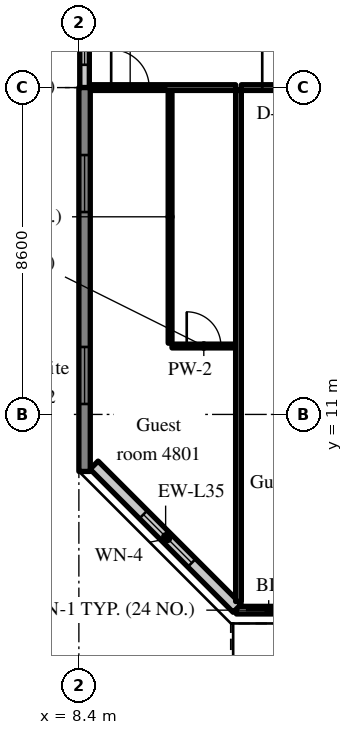
"""IFC4 building model, lengths in metres.
Left out: names, types, materials, properties, quantities, classifications, styles, units other than length and angle.
Written with IfcOpenShell. Run it as: python <this file> out.ifc"""

import sys

from ifc_helpers import new_model, si_unit, direction, frame, frame_2d, origin, place, context, subcontext, project, spatial, rectangle, extrude, source, transform, mapped, element, fill, save


model = new_model("IFC4")
c1 = context("Model", 3, precision=1e-05, world=origin(), true_north=direction((0.0, 1.0)))
c2 = subcontext(c1, "Body", "Model", "MODEL_VIEW")
j1 = project(units=[si_unit("LENGTHUNIT", "METRE"), si_unit("PLANEANGLEUNIT", "RADIAN")], contexts=[c1])
p1 = place(None, origin())
s1 = spatial("IfcSite", under=j1, at=p1, CompositionType="ELEMENT")
p2 = place(p1, origin())
s2 = spatial("IfcBuilding", under=s1, at=p2, CompositionType="ELEMENT")
p3 = place(p2, frame((0.0, 0.0, 197.2)))
s3 = spatial("IfcBuildingStorey", under=s2, at=p3, CompositionType="ELEMENT", Elevation=197.2)
m1 = source(origin(), c2, "Body", "SweptSolid", [
    extrude(rectangle(XDim=10.1, YDim=0.3, at=frame_2d((5.05, 0.0))), origin(), (0.0, 0.0, 1.0), 3.52),
])
p4 = place(p3, frame((8.55, 9.5, 0.0), z_axis=(0.0, 0.0, 1.0), x_axis=(0.0, 1.0, 0.0)))
e1 = element("IfcWall", 1, at=p4, inside=s3, PredefinedType="SHEAR", context=c2, shape_type="MappedRepresentation", body=[
    mapped(m1, transform((0.0, 0.0, 0.0), scale=1.0)),
])
m2 = source(origin(), c2, "Body", "SweptSolid", [
    extrude(rectangle(XDim=1.5, YDim=1.5, at=frame_2d((0.75, 0.75))), frame((0.0, 0.16, 0.0), z_axis=(0.0, -1.0, 0.0), x_axis=(1.0, 0.0, 0.0)), (0.0, 0.0, 1.0), 0.32),
])
p5 = place(p4, frame((1.775, 0.0, 0.9)))
e2 = element("IfcOpeningElement", 2, at=p5, cuts=e1, PredefinedType="OPENING", context=c2, shape_type="MappedRepresentation", body=[
    mapped(m2, transform((0.0, 0.0, 0.0), scale=1.0)),
])
p6 = place(p4, frame((6.825, 0.0, 0.9)))
e3 = element("IfcOpeningElement", 3, at=p6, cuts=e1, PredefinedType="OPENING", context=c2, shape_type="MappedRepresentation", body=[
    mapped(m2, transform((0.0, 0.0, 0.0), scale=1.0)),
])
m3 = source(origin(), c2, "Body", "SweptSolid", [
    extrude(rectangle(XDim=4.105, YDim=0.2, at=frame_2d((2.052, 0.0))), origin(), (0.0, 0.0, 1.0), 2.87),
])
p7 = place(p3, frame((12.545, 5.85, 0.0), z_axis=(0.0, 0.0, 1.0), x_axis=(1.0, 0.0, 0.0)))
e4 = element("IfcWall", 4, at=p7, inside=s3, PredefinedType="SOLIDWALL", context=c2, shape_type="MappedRepresentation", body=[
    mapped(m3, transform((0.0, 0.0, 0.0), scale=1.0)),
])
m4 = source(origin(), c2, "Body", "SweptSolid", [
    extrude(rectangle(XDim=1.2, YDim=2.4, at=frame_2d((0.6, 1.2))), frame((0.0, 0.11, 0.0), z_axis=(0.0, -1.0, 0.0), x_axis=(1.0, 0.0, 0.0)), (0.0, 0.0, 1.0), 0.22),
])
p8 = place(p7, frame((0.25, 0.0, 0.0)))
e5 = element("IfcOpeningElement", 5, at=p8, cuts=e4, PredefinedType="OPENING", context=c2, shape_type="MappedRepresentation", body=[
    mapped(m4, transform((0.0, 0.0, 0.0), scale=1.0)),
])
m5 = source(origin(), c2, "Body", "SweptSolid", [
    extrude(rectangle(XDim=1.5, YDim=1.5, at=frame_2d((0.75, 0.75))), frame((0.0, 0.11, 0.0), z_axis=(0.0, -1.0, 0.0), x_axis=(1.0, 0.0, 0.0)), (0.0, 0.0, 1.0), 0.22),
])
p9 = place(p7, frame((2.355, 0.0, 0.9)))
e6 = element("IfcOpeningElement", 6, at=p9, cuts=e4, PredefinedType="OPENING", context=c2, shape_type="MappedRepresentation", body=[
    mapped(m5, transform((0.0, 0.0, 0.0), scale=1.0)),
])
m6 = source(origin(), c2, "Body", "SweptSolid", [
    extrude(rectangle(XDim=5.326, YDim=0.3, at=frame_2d((2.663, 0.0))), origin(), (0.0, 0.0, 1.0), 3.52),
])
p10 = place(p3, frame((8.8, 9.666, 0.0), z_axis=(0.0, 0.0, 1.0), x_axis=(0.707083859269, -0.707129702361, 0.0)))
e7 = element("IfcWall", 7, at=p10, inside=s3, PredefinedType="SOLIDWALL", context=c2, shape_type="MappedRepresentation", body=[
    mapped(m6, transform((0.0, 0.0, 0.0), scale=1.0)),
])
m7 = source(origin(), c2, "Body", "SweptSolid", [
    extrude(rectangle(XDim=1.8, YDim=1.5, at=frame_2d((0.9, 0.75))), frame((0.0, 0.16, 0.0), z_axis=(0.0, -1.0, 0.0), x_axis=(1.0, 0.0, 0.0)), (0.0, 0.0, 1.0), 0.32),
])
p11 = place(p10, frame((1.836, 0.0, 0.9)))
e8 = element("IfcOpeningElement", 8, at=p11, cuts=e7, PredefinedType="OPENING", context=c2, shape_type="MappedRepresentation", body=[
    mapped(m7, transform((0.0, 0.0, 0.0), scale=1.0)),
])
m8 = source(origin(), c2, "Body", "SweptSolid", [
    extrude(rectangle(XDim=2.4, YDim=0.25, at=frame_2d((1.2, 0.0))), origin(), (0.0, 0.0, 1.0), 2.62),
])
p12 = place(p3, frame((8.55, 19.6, 0.0), z_axis=(0.0, 0.0, 1.0), x_axis=(0.0, 1.0, 0.0)))
e9 = element("IfcWall", 9, at=p12, inside=s3, PredefinedType="SOLIDWALL", context=c2, shape_type="MappedRepresentation", body=[
    mapped(m8, transform((0.0, 0.0, 0.0), scale=1.0)),
])
m9 = source(origin(), c2, "Body", "SweptSolid", [
    extrude(rectangle(XDim=1.2, YDim=1.5, at=frame_2d((0.6, 0.75))), frame((0.0, 0.135, 0.0), z_axis=(0.0, -1.0, 0.0), x_axis=(1.0, 0.0, 0.0)), (0.0, 0.0, 1.0), 0.27),
])
p13 = place(p12, frame((0.6, 0.0, 0.9)))
e10 = element("IfcOpeningElement", 10, at=p13, cuts=e9, PredefinedType="OPENING", context=c2, shape_type="MappedRepresentation", body=[
    mapped(m9, transform((0.0, 0.0, 0.0), scale=1.0)),
])
m10 = source(origin(), c2, "Body", "SweptSolid", [
    extrude(rectangle(XDim=6.65, YDim=0.1, at=frame_2d((3.325, 0.0))), origin(), (0.0, 0.0, 1.0), 3.52),
])
p14 = place(p3, frame((10.8, 12.875, 0.0), z_axis=(0.0, 0.0, 1.0), x_axis=(0.0, 1.0, 0.0)))
e11 = element("IfcWall", 11, at=p14, inside=s3, PredefinedType="PARTITIONING", context=c2, shape_type="MappedRepresentation", body=[
    mapped(m10, transform((0.0, 0.0, 0.0), scale=1.0)),
])
m11 = source(origin(), c2, "Body", "SweptSolid", [
    extrude(rectangle(XDim=1.675, YDim=0.1, at=frame_2d((0.837, 0.0))), origin(), (0.0, 0.0, 1.0), 3.52),
])
p15 = place(p3, frame((10.85, 12.8, 0.0), z_axis=(0.0, 0.0, 1.0), x_axis=(1.0, 0.0, 0.0)))
e12 = element("IfcWall", 12, at=p15, inside=s3, PredefinedType="PARTITIONING", context=c2, shape_type="MappedRepresentation", body=[
    mapped(m11, transform((0.0, 0.0, 0.0), scale=1.0)),
])
m12 = source(origin(), c2, "Body", "SweptSolid", [
    extrude(rectangle(XDim=0.9, YDim=2.1, at=frame_2d((0.45, 1.05))), frame((0.0, 0.06, 0.0), z_axis=(0.0, -1.0, 0.0), x_axis=(1.0, 0.0, 0.0)), (0.0, 0.0, 1.0), 0.12),
])
p16 = place(p15, frame((0.388, 0.0, 0.0)))
e13 = element("IfcOpeningElement", 13, at=p16, cuts=e12, PredefinedType="OPENING", context=c2, shape_type="MappedRepresentation", body=[
    mapped(m12, transform((0.0, 0.0, 0.0), scale=1.0)),
])
m13 = source(origin(), c2, "Body", "SweptSolid", [
    extrude(rectangle(XDim=3.825, YDim=0.15, at=frame_2d((1.913, 0.0))), origin(), (0.0, 0.0, 1.0), 2.82),
])
p17 = place(p3, frame((8.7, 19.6, 0.0), z_axis=(0.0, 0.0, 1.0), x_axis=(1.0, 0.0, 0.0)))
e14 = element("IfcWall", 14, at=p17, inside=s3, PredefinedType="PARTITIONING", context=c2, shape_type="MappedRepresentation", body=[
    mapped(m13, transform((0.0, 0.0, 0.0), scale=1.0)),
])
m14 = source(origin(), c2, "Body", "SweptSolid", [
    extrude(rectangle(XDim=1.0, YDim=2.1, at=frame_2d((0.5, 1.05))), frame((0.0, 0.085, 0.0), z_axis=(0.0, -1.0, 0.0), x_axis=(1.0, 0.0, 0.0)), (0.0, 0.0, 1.0), 0.17),
])
p18 = place(p17, frame((0.55, 0.0, 0.0)))
e15 = element("IfcOpeningElement", 15, at=p18, cuts=e14, PredefinedType="OPENING", context=c2, shape_type="MappedRepresentation", body=[
    mapped(m14, transform((0.0, 0.0, 0.0), scale=1.0)),
])
m15 = source(origin(), c2, "Body", "SweptSolid", [
    extrude(rectangle(XDim=3.975, YDim=0.15, at=frame_2d((1.987, 0.0))), origin(), (0.0, 0.0, 1.0), 2.82),
])
p19 = place(p3, frame((12.675, 19.6, 0.0), z_axis=(0.0, 0.0, 1.0), x_axis=(1.0, 0.0, 0.0)))
e16 = element("IfcWall", 16, at=p19, inside=s3, PredefinedType="PARTITIONING", context=c2, shape_type="MappedRepresentation", body=[
    mapped(m15, transform((0.0, 0.0, 0.0), scale=1.0)),
])
p20 = place(p19, frame((0.55, 0.0, 0.0)))
e17 = element("IfcOpeningElement", 17, at=p20, cuts=e16, PredefinedType="OPENING", context=c2, shape_type="MappedRepresentation", body=[
    mapped(m14, transform((0.0, 0.0, 0.0), scale=1.0)),
])
m16 = source(origin(), c2, "Body", "SweptSolid", [
    extrude(rectangle(XDim=13.447, YDim=0.15, at=frame_2d((6.724, 0.0))), origin(), (0.0, 0.0, 1.0), 3.52),
])
p21 = place(p3, frame((12.6, 6.078, 0.0), z_axis=(0.0, 0.0, 1.0), x_axis=(0.0, 1.0, 0.0)))
e18 = element("IfcWall", 18, at=p21, inside=s3, PredefinedType="PARTITIONING", context=c2, shape_type="MappedRepresentation", body=[
    mapped(m16, transform((0.0, 0.0, 0.0), scale=1.0)),
])
m17 = source(origin(), c2, "Body", "SweptSolid", [
    extrude(rectangle(XDim=1.2, YDim=2.4, at=frame_2d((0.6, 1.2))), frame((0.0, 0.025, 0.0), z_axis=(0.0, -1.0, 0.0), x_axis=(1.0, 0.0, 0.0)), (0.0, 0.0, 1.0), 0.05),
])
p22 = place(p8, origin())
e19 = element("IfcDoor", 19, at=p22, inside=s3, OperationType="SLIDING_TO_LEFT", PredefinedType="DOOR", context=c2, shape_type="MappedRepresentation", body=[
    mapped(m17, transform((0.0, 0.0, 0.0), scale=1.0)),
])
fill(e5, e19)
m18 = source(origin(), c2, "Body", "SweptSolid", [
    extrude(rectangle(XDim=1.8, YDim=1.5, at=frame_2d((0.9, 0.75))), frame((0.0, 0.03, 0.0), z_axis=(0.0, -1.0, 0.0), x_axis=(1.0, 0.0, 0.0)), (0.0, 0.0, 1.0), 0.06),
])
p23 = place(p11, origin())
e20 = element("IfcWindow", 20, at=p23, inside=s3, PartitioningType="SINGLE_PANEL", PredefinedType="WINDOW", context=c2, shape_type="MappedRepresentation", body=[
    mapped(m18, transform((0.0, 0.0, 0.0), scale=1.0)),
])
fill(e8, e20)
m19 = source(origin(), c2, "Body", "SweptSolid", [
    extrude(rectangle(XDim=1.5, YDim=1.5, at=frame_2d((0.75, 0.75))), frame((0.0, 0.03, 0.0), z_axis=(0.0, -1.0, 0.0), x_axis=(1.0, 0.0, 0.0)), (0.0, 0.0, 1.0), 0.06),
])
p24 = place(p5, origin())
e21 = element("IfcWindow", 21, at=p24, inside=s3, PartitioningType="SINGLE_PANEL", PredefinedType="WINDOW", context=c2, shape_type="MappedRepresentation", body=[
    mapped(m19, transform((0.0, 0.0, 0.0), scale=1.0)),
])
fill(e2, e21)
p25 = place(p6, origin())
e22 = element("IfcWindow", 22, at=p25, inside=s3, PartitioningType="SINGLE_PANEL", PredefinedType="WINDOW", context=c2, shape_type="MappedRepresentation", body=[
    mapped(m19, transform((0.0, 0.0, 0.0), scale=1.0)),
])
fill(e3, e22)
m20 = source(origin(), c2, "Body", "SweptSolid", [
    extrude(rectangle(XDim=1.2, YDim=1.5, at=frame_2d((0.6, 0.75))), frame((0.0, 0.03, 0.0), z_axis=(0.0, -1.0, 0.0), x_axis=(1.0, 0.0, 0.0)), (0.0, 0.0, 1.0), 0.06),
])
p26 = place(p13, origin())
e23 = element("IfcWindow", 23, at=p26, inside=s3, PartitioningType="SINGLE_PANEL", PredefinedType="WINDOW", context=c2, shape_type="MappedRepresentation", body=[
    mapped(m20, transform((0.0, 0.0, 0.0), scale=1.0)),
])
fill(e10, e23)
m21 = source(origin(), c2, "Body", "SweptSolid", [
    extrude(rectangle(XDim=0.9, YDim=2.1, at=frame_2d((0.45, 1.05))), frame((0.0, 0.025, 0.0), z_axis=(0.0, -1.0, 0.0), x_axis=(1.0, 0.0, 0.0)), (0.0, 0.0, 1.0), 0.05),
])
p27 = place(p16, origin())
e24 = element("IfcDoor", 24, at=p27, inside=s3, OperationType="SINGLE_SWING_LEFT", PredefinedType="DOOR", context=c2, shape_type="MappedRepresentation", body=[
    mapped(m21, transform((0.0, 0.0, 0.0), scale=1.0)),
])
fill(e13, e24)
m22 = source(origin(), c2, "Body", "SweptSolid", [
    extrude(rectangle(XDim=1.0, YDim=2.1, at=frame_2d((0.5, 1.05))), frame((0.0, 0.025, 0.0), z_axis=(0.0, -1.0, 0.0), x_axis=(1.0, 0.0, 0.0)), (0.0, 0.0, 1.0), 0.05),
])
p28 = place(p18, origin())
e25 = element("IfcDoor", 25, at=p28, inside=s3, OperationType="SINGLE_SWING_LEFT", PredefinedType="DOOR", context=c2, shape_type="MappedRepresentation", body=[
    mapped(m22, transform((0.0, 0.0, 0.0), scale=1.0)),
])
fill(e15, e25)
p29 = place(p20, origin())
e26 = element("IfcDoor", 26, at=p29, inside=s3, OperationType="SINGLE_SWING_LEFT", PredefinedType="DOOR", context=c2, shape_type="MappedRepresentation", body=[
    mapped(m22, transform((0.0, 0.0, 0.0), scale=1.0)),
])
fill(e17, e26)
save(model, sys.argv[1])
